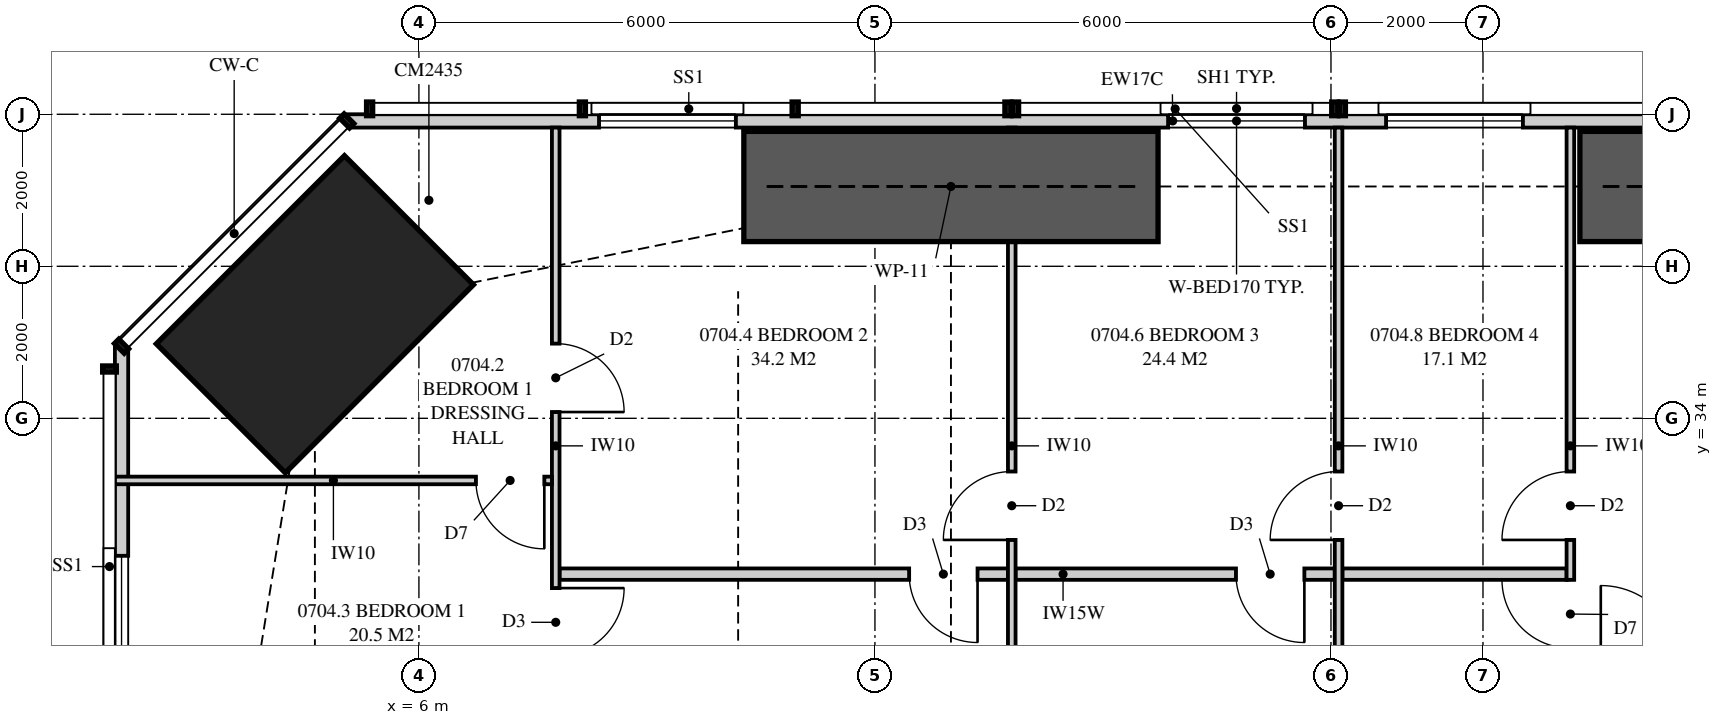
"""IFC4 building model, lengths in metres.
Left out: names, types, materials, properties, quantities, classifications, styles, units other than length and angle.
Written with IfcOpenShell. Run it as: python <this file> out.ifc"""

import sys

from ifc_helpers import new_model, si_unit, direction, frame, frame_2d, origin, origin_2d, place, context, subcontext, project, spatial, polyline, rectangle, outline, extrude, element, fill, save


model = new_model("IFC4")
c1 = context("Model", 3, precision=1e-05, world=origin(), true_north=direction((0.0, 1.0)))
c2 = subcontext(c1, "Body", "Model", "MODEL_VIEW")
j1 = project(units=[si_unit("LENGTHUNIT", "METRE"), si_unit("PLANEANGLEUNIT", "RADIAN")], contexts=[c1])
p1 = place(None, origin())
s1 = spatial("IfcSite", under=j1, at=p1, CompositionType="ELEMENT")
p2 = place(p1, origin())
s2 = spatial("IfcBuilding", under=s1, at=p2, CompositionType="ELEMENT")
p3 = place(p2, frame((0.0, 0.0, 31.05)))
s3 = spatial("IfcBuildingStorey", under=s2, at=p3, CompositionType="ELEMENT", Elevation=31.05)
p4 = place(p3, frame((4.631, 35.369, 0.0), z_axis=(0.0, 0.0, 1.0), x_axis=(0.707106781187, -0.707106781187, 0.0)))
e1 = element("IfcColumn", 1, at=p4, inside=s3, PredefinedType="COLUMN", context=c2, shape_type="SweptSolid", body=[
    extrude(rectangle(XDim=2.4, YDim=3.5, at=origin_2d()), origin(), (0.0, 0.0, 1.0), 3.35),
])
p5 = place(p3, frame((26.783, 37.913, 0.0), z_axis=(0.0, 0.0, 1.0), x_axis=(-1.0, 0.0, 0.0)))
e2 = element("IfcWall", 2, at=p5, inside=s3, PredefinedType="SOLIDWALL", context=c2, shape_type="SweptSolid", body=[
    extrude(outline(polyline([(0.0, 0.0), (21.732, 0.0), (21.732, 3.11), (13.987, 3.11), (13.987, 2.15), (13.939, 2.15), (13.939, 3.11), (13.783, 3.11), (13.783, 2.15), (0.0, 2.15), (0.0, 0.0)])), frame((0.0, 0.087, 0.0), z_axis=(0.0, -1.0, 0.0), x_axis=(1.0, 0.0, 0.0)), (0.0, 0.0, 1.0), 0.175),
])
p6 = place(p5, frame((6.258, 0.0, 0.4)))
e3 = element("IfcOpeningElement", 3, at=p6, cuts=e2, PredefinedType="OPENING", context=c2, shape_type="SweptSolid", body=[
    extrude(rectangle(XDim=1.8, YDim=1.7, at=frame_2d((0.9, 0.85))), frame((0.0, 0.097, 0.0), z_axis=(0.0, -1.0, 0.0), x_axis=(1.0, 0.0, 0.0)), (0.0, 0.0, 1.0), 0.195),
])
p7 = place(p5, frame((9.126, 0.0, 0.4)))
e4 = element("IfcOpeningElement", 4, at=p7, cuts=e2, PredefinedType="OPENING", context=c2, shape_type="SweptSolid", body=[
    extrude(rectangle(XDim=1.8, YDim=1.7, at=frame_2d((0.9, 0.85))), frame((0.0, 0.097, 0.0), z_axis=(0.0, -1.0, 0.0), x_axis=(1.0, 0.0, 0.0)), (0.0, 0.0, 1.0), 0.195),
])
p8 = place(p5, frame((16.613, 0.0, 0.4)))
e5 = element("IfcOpeningElement", 5, at=p8, cuts=e2, PredefinedType="OPENING", context=c2, shape_type="SweptSolid", body=[
    extrude(rectangle(XDim=1.8, YDim=1.7, at=frame_2d((0.9, 0.85))), frame((0.0, 0.097, 0.0), z_axis=(0.0, -1.0, 0.0), x_axis=(1.0, 0.0, 0.0)), (0.0, 0.0, 1.0), 0.195),
])
p9 = place(p3, frame((2.087, 34.949, 0.0), z_axis=(0.0, 0.0, 1.0), x_axis=(0.0, -1.0, 0.0)))
e6 = element("IfcWall", 6, at=p9, inside=s3, PredefinedType="SOLIDWALL", context=c2, shape_type="SweptSolid", body=[
    extrude(outline(polyline([(0.0, 0.0), (14.557, 0.0), (14.557, 2.15), (9.949, 2.15), (9.949, 3.11), (9.823, 3.11), (9.823, 2.15), (9.73, 2.15), (9.73, 3.11), (0.0, 3.11), (0.0, 0.0)])), frame((0.0, 0.087, 0.0), z_axis=(0.0, -1.0, 0.0), x_axis=(1.0, 0.0, 0.0)), (0.0, 0.0, 1.0), 0.175),
])
p10 = place(p9, frame((2.757, 0.0, 0.4)))
e7 = element("IfcOpeningElement", 7, at=p10, cuts=e6, PredefinedType="OPENING", context=c2, shape_type="SweptSolid", body=[
    extrude(rectangle(XDim=1.8, YDim=1.7, at=frame_2d((0.9, 0.85))), frame((0.0, 0.097, 0.0), z_axis=(0.0, -1.0, 0.0), x_axis=(1.0, 0.0, 0.0)), (0.0, 0.0, 1.0), 0.195),
])
p11 = place(p9, frame((5.899, 0.0, 0.4)))
e8 = element("IfcOpeningElement", 8, at=p11, cuts=e6, PredefinedType="OPENING", context=c2, shape_type="SweptSolid", body=[
    extrude(rectangle(XDim=1.2, YDim=1.7, at=frame_2d((0.6, 0.85))), frame((0.0, 0.097, 0.0), z_axis=(0.0, -1.0, 0.0), x_axis=(1.0, 0.0, 0.0)), (0.0, 0.0, 1.0), 0.195),
])
p12 = place(p3, frame((7.8, 37.825, 0.0), z_axis=(0.0, 0.0, 1.0), x_axis=(0.0, -1.0, 0.0)))
e9 = element("IfcWall", 9, at=p12, inside=s3, PredefinedType="PARTITIONING", context=c2, shape_type="SweptSolid", body=[
    extrude(outline(polyline([(0.0, 0.0), (8.375, 0.0), (8.375, 3.11), (2.697, 3.11), (2.697, 2.15), (0.943, 2.15), (0.943, 3.11), (0.0, 3.11), (0.0, 0.0)])), frame((0.0, 0.05, 0.0), z_axis=(0.0, -1.0, 0.0), x_axis=(1.0, 0.0, 0.0)), (0.0, 0.0, 1.0), 0.1),
])
p13 = place(p12, frame((2.842, 0.0, 0.0)))
e10 = element("IfcOpeningElement", 10, at=p13, cuts=e9, PredefinedType="OPENING", context=c2, shape_type="SweptSolid", body=[
    extrude(rectangle(XDim=0.9, YDim=2.1, at=frame_2d((0.45, 1.05))), frame((0.0, 0.06, 0.0), z_axis=(0.0, -1.0, 0.0), x_axis=(1.0, 0.0, 0.0)), (0.0, 0.0, 1.0), 0.12),
])
p14 = place(p12, frame((6.059, 0.0, 0.0)))
e11 = element("IfcOpeningElement", 11, at=p14, cuts=e9, PredefinedType="OPENING", context=c2, shape_type="SweptSolid", body=[
    extrude(rectangle(XDim=0.9, YDim=2.1, at=frame_2d((0.45, 1.05))), frame((0.0, 0.06, 0.0), z_axis=(0.0, -1.0, 0.0), x_axis=(1.0, 0.0, 0.0)), (0.0, 0.0, 1.0), 0.12),
])
p15 = place(p3, frame((13.8, 37.825, 0.0), z_axis=(0.0, 0.0, 1.0), x_axis=(0.0, -1.0, 0.0)))
e12 = element("IfcWall", 12, at=p15, inside=s3, PredefinedType="PARTITIONING", context=c2, shape_type="SweptSolid", body=[
    extrude(outline(polyline([(1.635, 2.15), (0.0, 2.15), (0.0, 0.0), (8.375, 0.0), (8.375, 3.11), (1.635, 3.11), (1.635, 2.15)]), holes=[polyline([(1.021, 0.126), (0.529, 0.126), (0.529, 0.919), (1.021, 0.919), (1.021, 0.126)]), polyline([(1.021, 1.231), (0.529, 1.231), (0.529, 2.024), (1.021, 2.024), (1.021, 1.231)])]), frame((0.0, 0.05, 0.0), z_axis=(0.0, -1.0, 0.0), x_axis=(1.0, 0.0, 0.0)), (0.0, 0.0, 1.0), 0.1),
])
p16 = place(p15, frame((4.525, 0.0, 0.0)))
e13 = element("IfcOpeningElement", 13, at=p16, cuts=e12, PredefinedType="OPENING", context=c2, shape_type="SweptSolid", body=[
    extrude(rectangle(XDim=0.9, YDim=2.1, at=frame_2d((0.45, 1.05))), frame((0.0, 0.06, 0.0), z_axis=(0.0, -1.0, 0.0), x_axis=(1.0, 0.0, 0.0)), (0.0, 0.0, 1.0), 0.12),
])
p17 = place(p3, frame((18.1, 37.825, 0.0), z_axis=(0.0, 0.0, 1.0), x_axis=(0.0, -1.0, 0.0)))
e14 = element("IfcWall", 14, at=p17, inside=s3, PredefinedType="PARTITIONING", context=c2, shape_type="SweptSolid", body=[
    extrude(outline(polyline([(0.0, 0.0), (8.375, 0.0), (8.375, 3.11), (1.635, 3.11), (1.635, 2.15), (0.0, 2.15), (0.0, 3.11), (0.0, 0.0)])), frame((0.0, 0.05, 0.0), z_axis=(0.0, -1.0, 0.0), x_axis=(1.0, 0.0, 0.0)), (0.0, 0.0, 1.0), 0.1),
])
p18 = place(p17, frame((4.525, 0.0, 0.0)))
e15 = element("IfcOpeningElement", 15, at=p18, cuts=e14, PredefinedType="OPENING", context=c2, shape_type="SweptSolid", body=[
    extrude(rectangle(XDim=0.9, YDim=2.1, at=frame_2d((0.45, 1.05))), frame((0.0, 0.06, 0.0), z_axis=(0.0, -1.0, 0.0), x_axis=(1.0, 0.0, 0.0)), (0.0, 0.0, 1.0), 0.12),
])
p19 = place(p3, frame((21.15, 37.825, 0.0), z_axis=(0.0, 0.0, 1.0), x_axis=(0.0, -1.0, 0.0)))
e16 = element("IfcWall", 16, at=p19, inside=s3, PredefinedType="PARTITIONING", context=c2, shape_type="SweptSolid", body=[
    extrude(outline(polyline([(0.0, 0.0), (8.375, 0.0), (8.375, 3.11), (1.635, 3.11), (1.635, 2.15), (0.0, 2.15), (0.0, 3.11), (0.0, 0.0)])), frame((0.0, 0.05, 0.0), z_axis=(0.0, -1.0, 0.0), x_axis=(1.0, 0.0, 0.0)), (0.0, 0.0, 1.0), 0.1),
])
p20 = place(p19, frame((4.525, 0.0, 0.0)))
e17 = element("IfcOpeningElement", 17, at=p20, cuts=e16, PredefinedType="OPENING", context=c2, shape_type="SweptSolid", body=[
    extrude(rectangle(XDim=0.9, YDim=2.1, at=frame_2d((0.45, 1.05))), frame((0.0, 0.06, 0.0), z_axis=(0.0, -1.0, 0.0), x_axis=(1.0, 0.0, 0.0)), (0.0, 0.0, 1.0), 0.12),
])
p21 = place(p19, frame((5.95, 0.0, 0.0)))
e18 = element("IfcOpeningElement", 18, at=p21, cuts=e16, PredefinedType="OPENING", context=c2, shape_type="SweptSolid", body=[
    extrude(rectangle(XDim=0.9, YDim=2.1, at=frame_2d((0.45, 1.05))), frame((0.0, 0.06, 0.0), z_axis=(0.0, -1.0, 0.0), x_axis=(1.0, 0.0, 0.0)), (0.0, 0.0, 1.0), 0.12),
])
p22 = place(p3, frame((2.0, 33.183, 0.0), z_axis=(0.0, 0.0, 1.0), x_axis=(1.0, 0.0, 0.0)))
e19 = element("IfcWall", 19, at=p22, inside=s3, PredefinedType="PARTITIONING", context=c2, shape_type="SweptSolid", body=[
    extrude(outline(polyline([(0.0, 0.0), (5.75, 0.0), (5.75, 3.11), (3.148, 3.11), (3.148, 2.15), (1.406, 2.15), (1.406, 3.11), (0.0, 3.11), (0.0, 0.0)])), frame((0.0, 0.05, 0.0), z_axis=(0.0, -1.0, 0.0), x_axis=(1.0, 0.0, 0.0)), (0.0, 0.0, 1.0), 0.1),
])
p23 = place(p22, frame((4.75, 0.0, 0.0)))
e20 = element("IfcOpeningElement", 20, at=p23, cuts=e19, PredefinedType="OPENING", context=c2, shape_type="SweptSolid", body=[
    extrude(rectangle(XDim=0.9, YDim=2.1, at=frame_2d((0.45, 1.05))), frame((0.0, 0.06, 0.0), z_axis=(0.0, -1.0, 0.0), x_axis=(1.0, 0.0, 0.0)), (0.0, 0.0, 1.0), 0.12),
])
p24 = place(p3, frame((7.85, 31.95, 0.0), z_axis=(0.0, 0.0, 1.0), x_axis=(1.0, 0.0, 0.0)))
e21 = element("IfcWall", 21, at=p24, inside=s3, PredefinedType="PLUMBINGWALL", context=c2, shape_type="SweptSolid", body=[
    extrude(outline(polyline([(0.0, 0.0), (5.9, 0.0), (5.9, 3.11), (5.462, 3.11), (5.462, 2.541), (4.838, 2.541), (4.838, 3.11), (3.635, 3.11), (3.635, 2.51), (1.065, 2.51), (1.065, 3.11), (0.0, 3.11), (0.0, 0.0)])), frame((0.0, 0.075, 0.0), z_axis=(0.0, -1.0, 0.0), x_axis=(1.0, 0.0, 0.0)), (0.0, 0.0, 1.0), 0.15),
])
p25 = place(p24, frame((4.6, 0.0, 0.0)))
e22 = element("IfcOpeningElement", 22, at=p25, cuts=e21, PredefinedType="OPENING", context=c2, shape_type="SweptSolid", body=[
    extrude(rectangle(XDim=0.9, YDim=2.1, at=frame_2d((0.45, 1.05))), frame((0.0, 0.085, 0.0), z_axis=(0.0, -1.0, 0.0), x_axis=(1.0, 0.0, 0.0)), (0.0, 0.0, 1.0), 0.17),
])
p26 = place(p3, frame((13.85, 31.95, 0.0), z_axis=(0.0, 0.0, 1.0), x_axis=(1.0, 0.0, 0.0)))
e23 = element("IfcWall", 23, at=p26, inside=s3, PredefinedType="PLUMBINGWALL", context=c2, shape_type="SweptSolid", body=[
    extrude(rectangle(XDim=4.2, YDim=0.15, at=frame_2d((2.1, 0.0))), origin(), (0.0, 0.0, 1.0), 3.11),
])
p27 = place(p26, frame((2.9, 0.0, 0.0)))
e24 = element("IfcOpeningElement", 24, at=p27, cuts=e23, PredefinedType="OPENING", context=c2, shape_type="SweptSolid", body=[
    extrude(rectangle(XDim=0.9, YDim=2.1, at=frame_2d((0.45, 1.05))), frame((0.0, 0.085, 0.0), z_axis=(0.0, -1.0, 0.0), x_axis=(1.0, 0.0, 0.0)), (0.0, 0.0, 1.0), 0.17),
])
p28 = place(p3, frame((18.15, 31.95, 0.0), z_axis=(0.0, 0.0, 1.0), x_axis=(1.0, 0.0, 0.0)))
e25 = element("IfcWall", 25, at=p28, inside=s3, PredefinedType="PLUMBINGWALL", context=c2, shape_type="SweptSolid", body=[
    extrude(rectangle(XDim=2.95, YDim=0.15, at=frame_2d((1.475, 0.0))), origin(), (0.0, 0.0, 1.0), 3.11),
])
for number, where, z_axis, x_axis in (
    (26, (21.275, 37.05, 0.0), (0.0, 0.0, 1.0), (1.0, 0.0, 0.0)),
    (27, (10.275, 37.05, 0.0), (0.0, 0.0, 1.0), (1.0, 0.0, 0.0)),
):
    element("IfcWall", number, at=place(p3, frame(where, z_axis=z_axis, x_axis=x_axis)), inside=s3, PredefinedType="SHEAR", context=c2, shape_type="SweptSolid", body=[
        extrude(rectangle(XDim=5.45, YDim=1.45, at=frame_2d((2.725, 0.0))), origin(), (0.0, 0.0, 1.0), 3.35),
    ])
p29 = place(p6, origin())
e28 = element("IfcWindow", 28, at=p29, inside=s3, PartitioningType="SINGLE_PANEL", PredefinedType="WINDOW", context=c2, shape_type="SweptSolid", body=[
    extrude(rectangle(XDim=1.8, YDim=1.7, at=frame_2d((0.9, 0.85))), frame((0.0, 0.03, 0.0), z_axis=(0.0, -1.0, 0.0), x_axis=(1.0, 0.0, 0.0)), (0.0, 0.0, 1.0), 0.06),
])
fill(e3, e28)
p30 = place(p7, origin())
e29 = element("IfcWindow", 29, at=p30, inside=s3, PartitioningType="SINGLE_PANEL", PredefinedType="WINDOW", context=c2, shape_type="SweptSolid", body=[
    extrude(rectangle(XDim=1.8, YDim=1.7, at=frame_2d((0.9, 0.85))), frame((0.0, 0.03, 0.0), z_axis=(0.0, -1.0, 0.0), x_axis=(1.0, 0.0, 0.0)), (0.0, 0.0, 1.0), 0.06),
])
fill(e4, e29)
p31 = place(p8, origin())
e30 = element("IfcWindow", 30, at=p31, inside=s3, PartitioningType="SINGLE_PANEL", PredefinedType="WINDOW", context=c2, shape_type="SweptSolid", body=[
    extrude(rectangle(XDim=1.8, YDim=1.7, at=frame_2d((0.9, 0.85))), frame((0.0, 0.03, 0.0), z_axis=(0.0, -1.0, 0.0), x_axis=(1.0, 0.0, 0.0)), (0.0, 0.0, 1.0), 0.06),
])
fill(e5, e30)
p32 = place(p10, origin())
e31 = element("IfcWindow", 31, at=p32, inside=s3, PartitioningType="SINGLE_PANEL", PredefinedType="WINDOW", context=c2, shape_type="SweptSolid", body=[
    extrude(rectangle(XDim=1.8, YDim=1.7, at=frame_2d((0.9, 0.85))), frame((0.0, 0.03, 0.0), z_axis=(0.0, -1.0, 0.0), x_axis=(1.0, 0.0, 0.0)), (0.0, 0.0, 1.0), 0.06),
])
fill(e7, e31)
p33 = place(p23, frame((0.9, 0.0, 0.0), z_axis=(0.0, 0.0, 1.0), x_axis=(-1.0, 0.0, 0.0)))
e32 = element("IfcDoor", 32, at=p33, inside=s3, OperationType="SINGLE_SWING_LEFT", PredefinedType="DOOR", context=c2, shape_type="SweptSolid", body=[
    extrude(rectangle(XDim=0.9, YDim=2.1, at=frame_2d((0.45, 1.05))), frame((0.0, 0.025, 0.0), z_axis=(0.0, -1.0, 0.0), x_axis=(1.0, 0.0, 0.0)), (0.0, 0.0, 1.0), 0.05),
])
fill(e20, e32)
p34 = place(p13, origin())
e33 = element("IfcDoor", 33, at=p34, inside=s3, OperationType="SINGLE_SWING_RIGHT", PredefinedType="DOOR", context=c2, shape_type="SweptSolid", body=[
    extrude(rectangle(XDim=0.9, YDim=2.1, at=frame_2d((0.45, 1.05))), frame((0.0, 0.025, 0.0), z_axis=(0.0, -1.0, 0.0), x_axis=(1.0, 0.0, 0.0)), (0.0, 0.0, 1.0), 0.05),
])
fill(e10, e33)
p35 = place(p16, frame((0.9, 0.0, 0.0), z_axis=(0.0, 0.0, 1.0), x_axis=(-1.0, 0.0, 0.0)))
e34 = element("IfcDoor", 34, at=p35, inside=s3, OperationType="SINGLE_SWING_LEFT", PredefinedType="DOOR", context=c2, shape_type="SweptSolid", body=[
    extrude(rectangle(XDim=0.9, YDim=2.1, at=frame_2d((0.45, 1.05))), frame((0.0, 0.025, 0.0), z_axis=(0.0, -1.0, 0.0), x_axis=(1.0, 0.0, 0.0)), (0.0, 0.0, 1.0), 0.05),
])
fill(e13, e34)
p36 = place(p25, frame((0.9, 0.0, 0.0), z_axis=(0.0, 0.0, 1.0), x_axis=(-1.0, 0.0, 0.0)))
e35 = element("IfcDoor", 35, at=p36, inside=s3, OperationType="SINGLE_SWING_LEFT", PredefinedType="DOOR", context=c2, shape_type="SweptSolid", body=[
    extrude(rectangle(XDim=0.9, YDim=2.1, at=frame_2d((0.45, 1.05))), frame((0.0, 0.025, 0.0), z_axis=(0.0, -1.0, 0.0), x_axis=(1.0, 0.0, 0.0)), (0.0, 0.0, 1.0), 0.05),
])
fill(e22, e35)
p37 = place(p18, frame((0.9, 0.0, 0.0), z_axis=(0.0, 0.0, 1.0), x_axis=(-1.0, 0.0, 0.0)))
e36 = element("IfcDoor", 36, at=p37, inside=s3, OperationType="SINGLE_SWING_LEFT", PredefinedType="DOOR", context=c2, shape_type="SweptSolid", body=[
    extrude(rectangle(XDim=0.9, YDim=2.1, at=frame_2d((0.45, 1.05))), frame((0.0, 0.025, 0.0), z_axis=(0.0, -1.0, 0.0), x_axis=(1.0, 0.0, 0.0)), (0.0, 0.0, 1.0), 0.05),
])
fill(e15, e36)
p38 = place(p27, frame((0.9, 0.0, 0.0), z_axis=(0.0, 0.0, 1.0), x_axis=(-1.0, 0.0, 0.0)))
e37 = element("IfcDoor", 37, at=p38, inside=s3, OperationType="SINGLE_SWING_LEFT", PredefinedType="DOOR", context=c2, shape_type="SweptSolid", body=[
    extrude(rectangle(XDim=0.9, YDim=2.1, at=frame_2d((0.45, 1.05))), frame((0.0, 0.025, 0.0), z_axis=(0.0, -1.0, 0.0), x_axis=(1.0, 0.0, 0.0)), (0.0, 0.0, 1.0), 0.05),
])
fill(e24, e37)
p39 = place(p20, frame((0.9, 0.0, 0.0), z_axis=(0.0, 0.0, 1.0), x_axis=(-1.0, 0.0, 0.0)))
e38 = element("IfcDoor", 38, at=p39, inside=s3, OperationType="SINGLE_SWING_LEFT", PredefinedType="DOOR", context=c2, shape_type="SweptSolid", body=[
    extrude(rectangle(XDim=0.9, YDim=2.1, at=frame_2d((0.45, 1.05))), frame((0.0, 0.025, 0.0), z_axis=(0.0, -1.0, 0.0), x_axis=(1.0, 0.0, 0.0)), (0.0, 0.0, 1.0), 0.05),
])
fill(e17, e38)
p40 = place(p21, frame((0.9, 0.0, 0.0), z_axis=(0.0, 0.0, 1.0), x_axis=(-1.0, 0.0, 0.0)))
e39 = element("IfcDoor", 39, at=p40, inside=s3, OperationType="SINGLE_SWING_RIGHT", PredefinedType="DOOR", context=c2, shape_type="SweptSolid", body=[
    extrude(rectangle(XDim=0.9, YDim=2.1, at=frame_2d((0.45, 1.05))), frame((0.0, 0.025, 0.0), z_axis=(0.0, -1.0, 0.0), x_axis=(1.0, 0.0, 0.0)), (0.0, 0.0, 1.0), 0.05),
])
fill(e18, e39)
p41 = place(p14, origin())
e40 = element("IfcDoor", 40, at=p41, inside=s3, OperationType="SINGLE_SWING_LEFT", PredefinedType="DOOR", context=c2, shape_type="SweptSolid", body=[
    extrude(rectangle(XDim=0.9, YDim=2.1, at=frame_2d((0.45, 1.05))), frame((0.0, 0.025, 0.0), z_axis=(0.0, -1.0, 0.0), x_axis=(1.0, 0.0, 0.0)), (0.0, 0.0, 1.0), 0.05),
])
fill(e11, e40)
save(model, sys.argv[1])
